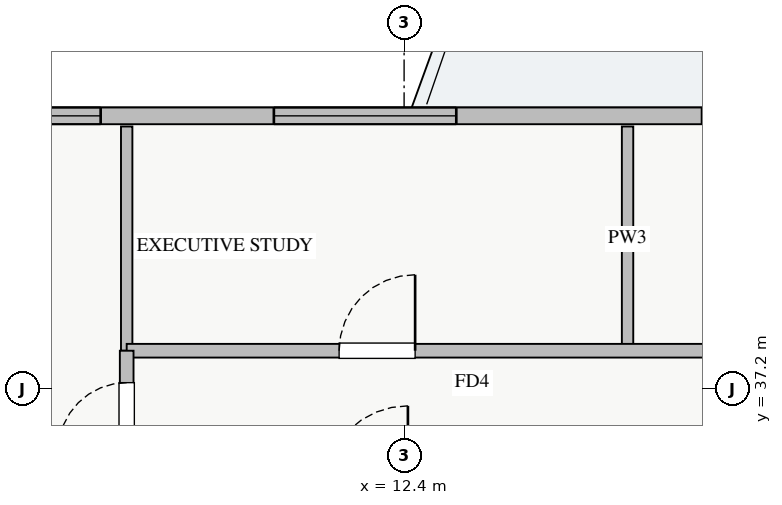
"""IFC4 building model, lengths in metres.
Left out: names, types, materials, properties, quantities, classifications, styles, units other than length and angle.
Written with IfcOpenShell. Run it as: python <this file> out.ifc"""

import sys

from ifc_helpers import new_model, si_unit, direction, frame, frame_2d, origin, place, context, subcontext, project, spatial, rectangle, extrude, source, transform, mapped, element, fill, save


model = new_model("IFC4")
c1 = context("Model", 3, precision=1e-05, world=origin(), true_north=direction((0.0, 1.0)))
c2 = subcontext(c1, "Body", "Model", "MODEL_VIEW")
j1 = project(units=[si_unit("LENGTHUNIT", "METRE"), si_unit("PLANEANGLEUNIT", "RADIAN")], contexts=[c1])
p1 = place(None, origin())
s1 = spatial("IfcSite", under=j1, at=p1, CompositionType="ELEMENT")
p2 = place(p1, origin())
s2 = spatial("IfcBuilding", under=s1, at=p2, CompositionType="ELEMENT")
p3 = place(p2, frame((0.0, 0.0, 150.25)))
s3 = spatial("IfcBuildingStorey", under=s2, at=p3, CompositionType="ELEMENT", Elevation=150.25)
p4 = place(p3, frame((6.55, 40.79, 0.0), z_axis=(0.0, 0.0, 1.0), x_axis=(1.0, 0.0, 0.0)))
e1 = element("IfcWall", 1, at=p4, inside=s3, PredefinedType="STANDARD", context=c2, shape_type="SweptSolid", body=[
    extrude(rectangle(XDim=24.9, YDim=0.22, at=frame_2d((12.45, 0.0))), origin(), (0.0, 0.0, 1.0), 2.61),
])
p5 = place(p4, frame((13.3, 0.0, 0.0)))
e2 = element("IfcOpeningElement", 2, at=p5, cuts=e1, PredefinedType="OPENING", context=c2, shape_type="SweptSolid", body=[
    extrude(rectangle(XDim=1.2, YDim=2.1, at=frame_2d((0.6, 1.05))), frame((0.0, 0.12, 0.0), z_axis=(0.0, -1.0, 0.0), x_axis=(1.0, 0.0, 0.0)), (0.0, 0.0, 1.0), 0.24),
])
p6 = place(p4, frame((0.357, 0.0, 0.9)))
e3 = element("IfcOpeningElement", 3, at=p6, cuts=e1, PredefinedType="OPENING", context=c2, shape_type="SweptSolid", body=[
    extrude(rectangle(XDim=1.5, YDim=1.5, at=frame_2d((0.75, 0.75))), frame((0.0, 0.12, 0.0), z_axis=(0.0, -1.0, 0.0), x_axis=(1.0, 0.0, 0.0)), (0.0, 0.0, 1.0), 0.24),
])
p7 = place(p4, frame((9.77, 0.0, 0.9)))
e4 = element("IfcOpeningElement", 4, at=p7, cuts=e1, PredefinedType="OPENING", context=c2, shape_type="SweptSolid", body=[
    extrude(rectangle(XDim=1.8, YDim=1.5, at=frame_2d((0.9, 0.75))), frame((0.0, 0.12, 0.0), z_axis=(0.0, -1.0, 0.0), x_axis=(1.0, 0.0, 0.0)), (0.0, 0.0, 1.0), 0.24),
])
p8 = place(p4, frame((14.813, 0.0, 0.9)))
e5 = element("IfcOpeningElement", 5, at=p8, cuts=e1, PredefinedType="OPENING", context=c2, shape_type="SweptSolid", body=[
    extrude(rectangle(XDim=1.5, YDim=1.45, at=frame_2d((0.75, 0.725))), frame((0.0, 0.12, 0.0), z_axis=(0.0, -1.0, 0.0), x_axis=(1.0, 0.0, 0.0)), (0.0, 0.0, 1.0), 0.24),
])
p9 = place(p4, frame((20.738, 0.0, 0.9)))
e6 = element("IfcOpeningElement", 6, at=p9, cuts=e1, PredefinedType="OPENING", context=c2, shape_type="SweptSolid", body=[
    extrude(rectangle(XDim=2.1, YDim=1.48, at=frame_2d((1.05, 0.74))), frame((0.0, 0.12, 0.0), z_axis=(0.0, -1.0, 0.0), x_axis=(1.0, 0.0, 0.0)), (0.0, 0.0, 1.0), 0.24),
])
p10 = place(p4, frame((4.136, 0.0, 0.9)))
e7 = element("IfcOpeningElement", 7, at=p10, cuts=e1, PredefinedType="OPENING", context=c2, shape_type="SweptSolid", body=[
    extrude(rectangle(XDim=2.4, YDim=1.5, at=frame_2d((1.2, 0.75))), frame((0.0, 0.12, 0.0), z_axis=(0.0, -1.0, 0.0), x_axis=(1.0, 0.0, 0.0)), (0.0, 0.0, 1.0), 0.24),
])
for number, where, z_axis, x_axis in (
    (8, (15.34, 37.7, 0.0), (0.0, 0.0, 1.0), (0.0, 1.0, 0.0)),
    (9, (8.75, 37.7, 0.0), (0.0, 0.0, 1.0), (0.0, 1.0, 0.0)),
):
    element("IfcWall", number, at=place(p3, frame(where, z_axis=z_axis, x_axis=x_axis)), inside=s3, PredefinedType="PARTITIONING", context=c2, shape_type="SweptSolid", body=[
        extrude(rectangle(XDim=2.95, YDim=0.15, at=frame_2d((1.475, 0.0))), origin(), (0.0, 0.0, 1.0), 3.07),
    ])
p11 = place(p3, frame((8.75, 37.7, 0.0), z_axis=(0.0, 0.0, 1.0), x_axis=(1.0, 0.0, 0.0)))
e10 = element("IfcWall", 10, at=p11, inside=s3, PredefinedType="PARTITIONING", context=c2, shape_type="SweptSolid", body=[
    extrude(rectangle(XDim=23.61, YDim=0.18, at=frame_2d((11.805, 0.0))), origin(), (0.0, 0.0, 1.0), 3.07),
])
p12 = place(p11, frame((2.795, 0.0, 0.0)))
e11 = element("IfcOpeningElement", 11, at=p12, cuts=e10, PredefinedType="OPENING", context=c2, shape_type="SweptSolid", body=[
    extrude(rectangle(XDim=1.0, YDim=2.05, at=frame_2d((0.5, 1.025))), frame((0.0, 0.1, 0.0), z_axis=(0.0, -1.0, 0.0), x_axis=(1.0, 0.0, 0.0)), (0.0, 0.0, 1.0), 0.2),
])
p13 = place(p11, frame((7.97, 0.0, 0.0)))
e12 = element("IfcOpeningElement", 12, at=p13, cuts=e10, PredefinedType="OPENING", context=c2, shape_type="SweptSolid", body=[
    extrude(rectangle(XDim=1.0, YDim=2.05, at=frame_2d((0.5, 1.025))), frame((0.0, 0.1, 0.0), z_axis=(0.0, -1.0, 0.0), x_axis=(1.0, 0.0, 0.0)), (0.0, 0.0, 1.0), 0.2),
])
p14 = place(p11, frame((13.385, 0.0, 0.0)))
e13 = element("IfcOpeningElement", 13, at=p14, cuts=e10, PredefinedType="OPENING", context=c2, shape_type="SweptSolid", body=[
    extrude(rectangle(XDim=1.0, YDim=2.05, at=frame_2d((0.5, 1.025))), frame((0.0, 0.1, 0.0), z_axis=(0.0, -1.0, 0.0), x_axis=(1.0, 0.0, 0.0)), (0.0, 0.0, 1.0), 0.2),
])
p15 = place(p11, frame((19.825, 0.0, 0.0)))
e14 = element("IfcOpeningElement", 14, at=p15, cuts=e10, PredefinedType="OPENING", context=c2, shape_type="SweptSolid", body=[
    extrude(rectangle(XDim=1.0, YDim=2.05, at=frame_2d((0.5, 1.025))), frame((0.0, 0.1, 0.0), z_axis=(0.0, -1.0, 0.0), x_axis=(1.0, 0.0, 0.0)), (0.0, 0.0, 1.0), 0.2),
])
p16 = place(p3, frame((8.75, 8.3, 0.0), z_axis=(0.0, 0.0, 1.0), x_axis=(0.0, 1.0, 0.0)))
e15 = element("IfcWall", 15, at=p16, inside=s3, PredefinedType="PARTITIONING", context=c2, shape_type="SweptSolid", body=[
    extrude(rectangle(XDim=29.4, YDim=0.18, at=frame_2d((14.7, 0.0))), origin(), (0.0, 0.0, 1.0), 3.07),
])
p17 = place(p16, frame((28.08, 0.0, 0.0)))
e16 = element("IfcOpeningElement", 16, at=p17, cuts=e15, PredefinedType="OPENING", context=c2, shape_type="SweptSolid", body=[
    extrude(rectangle(XDim=0.9, YDim=2.05, at=frame_2d((0.45, 1.025))), frame((0.0, 0.1, 0.0), z_axis=(0.0, -1.0, 0.0), x_axis=(1.0, 0.0, 0.0)), (0.0, 0.0, 1.0), 0.2),
])
p18 = place(p16, frame((0.245, 0.0, 0.0)))
e17 = element("IfcOpeningElement", 17, at=p18, cuts=e15, PredefinedType="OPENING", context=c2, shape_type="SweptSolid", body=[
    extrude(rectangle(XDim=0.9, YDim=2.05, at=frame_2d((0.45, 1.025))), frame((0.0, 0.1, 0.0), z_axis=(0.0, -1.0, 0.0), x_axis=(1.0, 0.0, 0.0)), (0.0, 0.0, 1.0), 0.2),
])
p19 = place(p16, frame((5.0, 0.0, 0.0)))
e18 = element("IfcOpeningElement", 18, at=p19, cuts=e15, PredefinedType="OPENING", context=c2, shape_type="SweptSolid", body=[
    extrude(rectangle(XDim=1.0, YDim=2.05, at=frame_2d((0.5, 1.025))), frame((0.0, 0.1, 0.0), z_axis=(0.0, -1.0, 0.0), x_axis=(1.0, 0.0, 0.0)), (0.0, 0.0, 1.0), 0.2),
])
p20 = place(p16, frame((11.165, 0.0, 0.0)))
e19 = element("IfcOpeningElement", 19, at=p20, cuts=e15, PredefinedType="OPENING", context=c2, shape_type="SweptSolid", body=[
    extrude(rectangle(XDim=1.0, YDim=2.05, at=frame_2d((0.5, 1.025))), frame((0.0, 0.1, 0.0), z_axis=(0.0, -1.0, 0.0), x_axis=(1.0, 0.0, 0.0)), (0.0, 0.0, 1.0), 0.2),
])
p21 = place(p16, frame((20.325, 0.0, 0.0)))
e20 = element("IfcOpeningElement", 20, at=p21, cuts=e15, PredefinedType="OPENING", context=c2, shape_type="SweptSolid", body=[
    extrude(rectangle(XDim=1.0, YDim=2.05, at=frame_2d((0.5, 1.025))), frame((0.0, 0.1, 0.0), z_axis=(0.0, -1.0, 0.0), x_axis=(1.0, 0.0, 0.0)), (0.0, 0.0, 1.0), 0.2),
])
m1 = source(origin(), c2, "Body", "SweptSolid", [
    extrude(rectangle(XDim=1.5, YDim=1.5, at=frame_2d((0.75, 0.75))), frame((0.0, 0.03, 0.0), z_axis=(0.0, -1.0, 0.0), x_axis=(1.0, 0.0, 0.0)), (0.0, 0.0, 1.0), 0.06),
])
p22 = place(p6, origin())
e21 = element("IfcWindow", 21, at=p22, inside=s3, PartitioningType="TRIPLE_PANEL_VERTICAL", PredefinedType="WINDOW", context=c2, shape_type="MappedRepresentation", body=[
    mapped(m1, transform((0.0, 0.0, 0.0), x_axis=(1.0, 0.0, 0.0), y_axis=(0.0, 1.0, 0.0), z_axis=(0.0, 0.0, 1.0), scale=1.0)),
])
fill(e3, e21)
m2 = source(origin(), c2, "Body", "SweptSolid", [
    extrude(rectangle(XDim=1.8, YDim=1.5, at=frame_2d((0.9, 0.75))), frame((0.0, 0.03, 0.0), z_axis=(0.0, -1.0, 0.0), x_axis=(1.0, 0.0, 0.0)), (0.0, 0.0, 1.0), 0.06),
])
p23 = place(p7, origin())
e22 = element("IfcWindow", 22, at=p23, inside=s3, PartitioningType="DOUBLE_PANEL_VERTICAL", PredefinedType="WINDOW", context=c2, shape_type="MappedRepresentation", body=[
    mapped(m2, transform((0.0, 0.0, 0.0), x_axis=(1.0, 0.0, 0.0), y_axis=(0.0, 1.0, 0.0), z_axis=(0.0, 0.0, 1.0), scale=1.0)),
])
fill(e4, e22)
m3 = source(origin(), c2, "Body", "SweptSolid", [
    extrude(rectangle(XDim=1.0, YDim=2.05, at=frame_2d((0.5, 1.025))), frame((0.0, 0.025, 0.0), z_axis=(0.0, -1.0, 0.0), x_axis=(1.0, 0.0, 0.0)), (0.0, 0.0, 1.0), 0.05),
])
p24 = place(p12, origin())
e23 = element("IfcDoor", 23, at=p24, inside=s3, OperationType="SINGLE_SWING_RIGHT", PredefinedType="DOOR", context=c2, shape_type="MappedRepresentation", body=[
    mapped(m3, transform((0.0, 0.0, 0.0), x_axis=(1.0, 0.0, 0.0), y_axis=(0.0, 1.0, 0.0), z_axis=(0.0, 0.0, 1.0), scale=1.0)),
])
fill(e11, e23)
m4 = source(origin(), c2, "Body", "SweptSolid", [
    extrude(rectangle(XDim=0.9, YDim=2.05, at=frame_2d((0.45, 1.025))), frame((0.0, 0.025, 0.0), z_axis=(0.0, -1.0, 0.0), x_axis=(1.0, 0.0, 0.0)), (0.0, 0.0, 1.0), 0.05),
])
p25 = place(p17, origin())
e24 = element("IfcDoor", 24, at=p25, inside=s3, OperationType="SINGLE_SWING_LEFT", PredefinedType="DOOR", context=c2, shape_type="MappedRepresentation", body=[
    mapped(m4, transform((0.0, 0.0, 0.0), x_axis=(1.0, 0.0, 0.0), y_axis=(0.0, 1.0, 0.0), z_axis=(0.0, 0.0, 1.0), scale=1.0)),
])
fill(e16, e24)
m5 = source(origin(), c2, "Body", "SweptSolid", [
    extrude(rectangle(XDim=2.4, YDim=1.5, at=frame_2d((1.2, 0.75))), frame((0.0, 0.03, 0.0), z_axis=(0.0, -1.0, 0.0), x_axis=(1.0, 0.0, 0.0)), (0.0, 0.0, 1.0), 0.06),
])
p26 = place(p10, origin())
e25 = element("IfcWindow", 25, at=p26, inside=s3, PartitioningType="TRIPLE_PANEL_VERTICAL", PredefinedType="WINDOW", context=c2, shape_type="MappedRepresentation", body=[
    mapped(m5, transform((0.0, 0.0, 0.0), x_axis=(1.0, 0.0, 0.0), y_axis=(0.0, 1.0, 0.0), z_axis=(0.0, 0.0, 1.0), scale=1.0)),
])
fill(e7, e25)
save(model, sys.argv[1])
